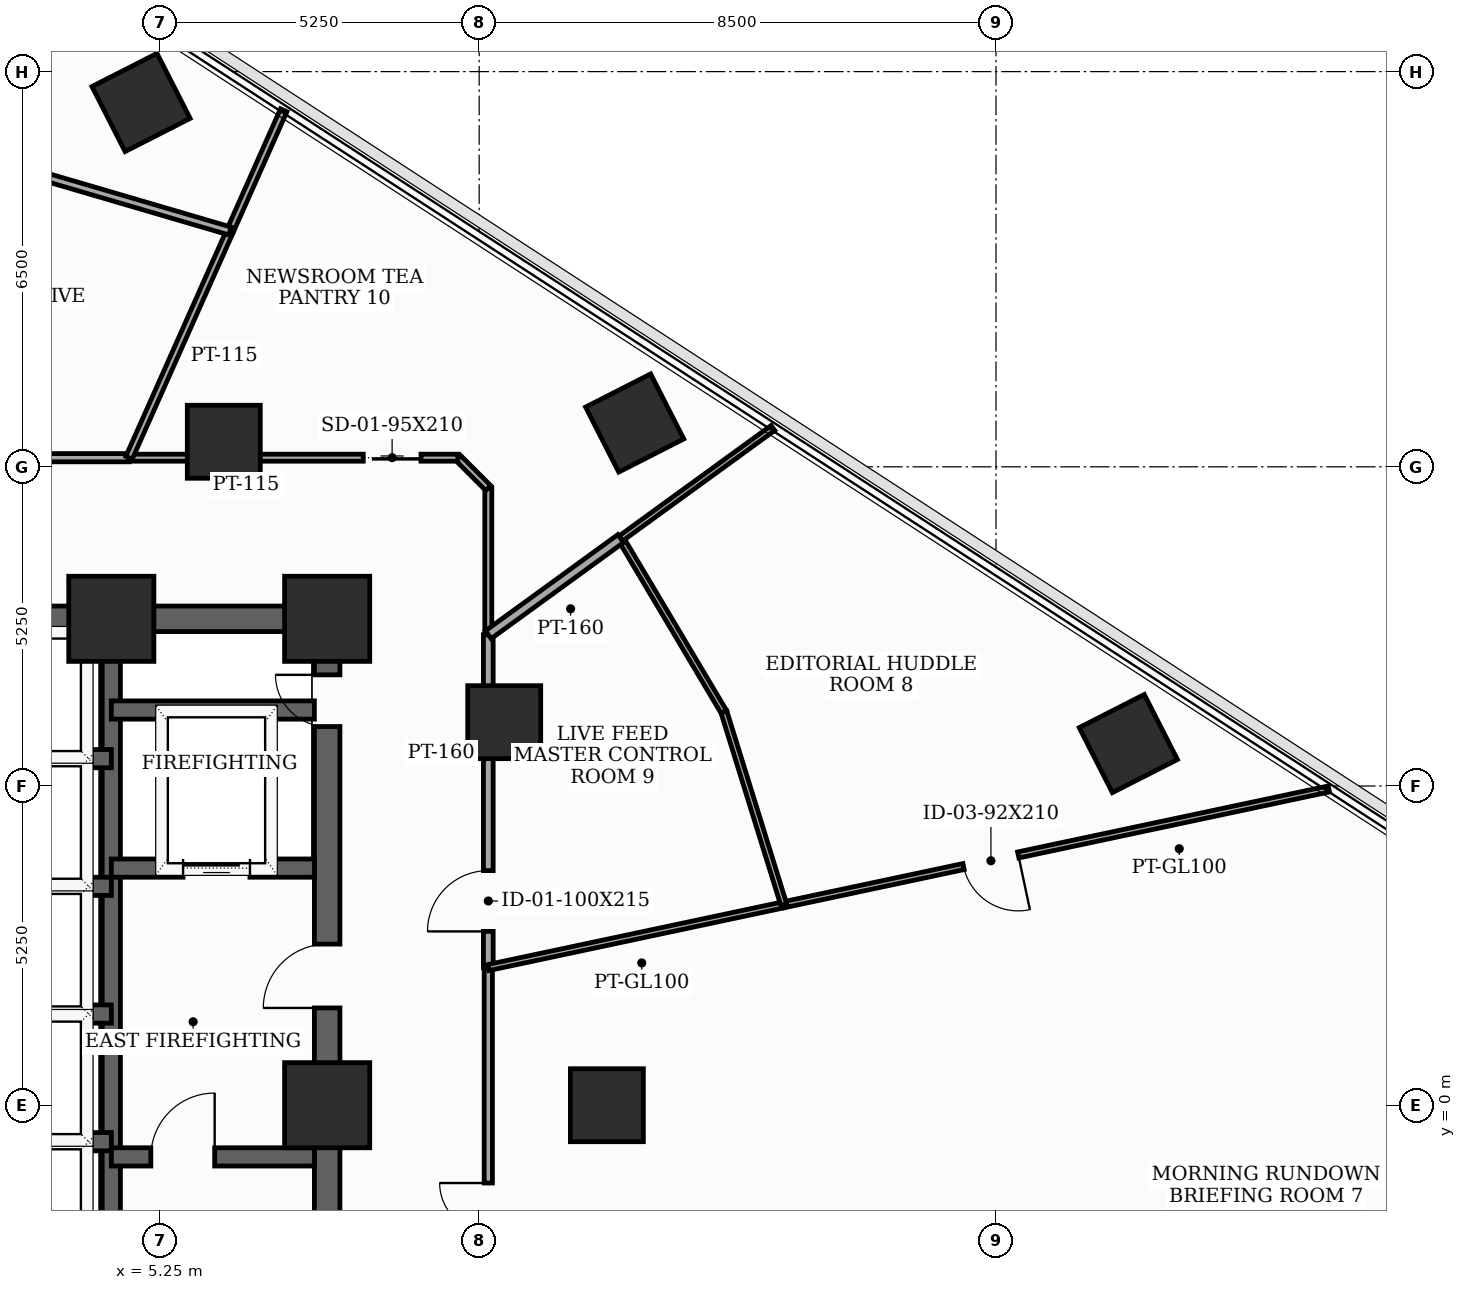
"""IFC4 building model, lengths in metres.
Left out: names, types, materials, properties, quantities, classifications, styles, units other than length and angle.
Written with IfcOpenShell. Run it as: python <this file> out.ifc"""

import sys

from ifc_helpers import new_model, si_unit, direction, frame, frame_2d, origin, origin_2d, place, context, subcontext, project, spatial, rectangle, extrude, element, fill, save


model = new_model("IFC4")
c1 = context("Model", 3, precision=1e-05, world=origin(), true_north=direction((0.0, 1.0)))
c2 = subcontext(c1, "Body", "Model", "MODEL_VIEW")
j1 = project(units=[si_unit("LENGTHUNIT", "METRE"), si_unit("PLANEANGLEUNIT", "RADIAN")], contexts=[c1])
p1 = place(None, origin())
s1 = spatial("IfcSite", under=j1, at=p1, CompositionType="ELEMENT")
p2 = place(p1, origin())
s2 = spatial("IfcBuilding", under=s1, at=p2, CompositionType="ELEMENT")
p3 = place(p2, frame((0.0, 0.0, 142.1)))
s3 = spatial("IfcBuildingStorey", under=s2, at=p3, CompositionType="ELEMENT", Elevation=142.1)
for number, where, z_axis, x_axis in (
    (1, (8.0, 0.0, 0.0), (0.0, 0.0, 1.0), (1.0, 0.0, 0.0)),
    (2, (8.0, 8.0, 0.0), (0.0, 0.0, 1.0), (1.0, 0.0, 0.0)),
    (3, (4.45, 8.0, 0.0), (0.0, 0.0, 1.0), (1.0, 0.0, 0.0)),
):
    element("IfcColumn", number, at=place(p3, frame(where, z_axis=z_axis, x_axis=x_axis)), inside=s3, PredefinedType="COLUMN", context=c2, shape_type="SweptSolid", body=[
        extrude(rectangle(XDim=1.4, YDim=1.4, at=origin_2d()), origin(), (0.0, 0.0, 1.0), 3.7),
    ])
for number, where, z_axis, x_axis in (
    (4, (12.6, 0.0, 0.0), (0.0, 0.0, 1.0), (1.0, 0.0, 0.0)),
    (5, (10.912, 6.3, 0.0), (0.0, 0.0, 1.0), (1.0, 0.0, 0.0)),
    (6, (6.3, 10.912, 0.0), (0.0, 0.0, 1.0), (1.0, 0.0, 0.0)),
    (7, (21.176, 5.948, 0.0), (0.0, 0.0, 1.0), (0.891, 0.454, 0.0)),
    (8, (13.058, 11.22, 0.0), (0.0, 0.0, 1.0), (0.891, 0.454, 0.0)),
    (9, (4.939, 16.492, 0.0), (0.0, 0.0, 1.0), (0.891, 0.454, 0.0)),
):
    element("IfcColumn", number, at=place(p3, frame(where, z_axis=z_axis, x_axis=x_axis)), inside=s3, PredefinedType="COLUMN", context=c2, shape_type="SweptSolid", body=[
        extrude(rectangle(XDim=1.2, YDim=1.2, at=origin_2d()), origin(), (0.0, 0.0, 1.0), 3.7),
    ])
p4 = place(p3, frame((8.0, -8.0, 0.0), z_axis=(0.0, 0.0, 1.0), x_axis=(0.0, 1.0, 0.0)))
e10 = element("IfcWall", 10, at=p4, inside=s3, PredefinedType="SHEAR", context=c2, shape_type="SweptSolid", body=[
    extrude(rectangle(XDim=16.0, YDim=0.42, at=frame_2d((8.0, 0.0))), origin(), (0.0, 0.0, 1.0), 3.5),
])
p5 = place(p4, frame((9.6, 0.0, 0.0)))
e11 = element("IfcOpeningElement", 11, at=p5, cuts=e10, PredefinedType="OPENING", context=c2, shape_type="SweptSolid", body=[
    extrude(rectangle(XDim=1.05, YDim=2.15, at=frame_2d((0.525, 1.075))), frame((0.0, 0.22, 0.0), z_axis=(0.0, -1.0, 0.0), x_axis=(1.0, 0.0, 0.0)), (0.0, 0.0, 1.0), 0.44),
])
p6 = place(p4, frame((14.229, 0.0, 0.0)))
e12 = element("IfcOpeningElement", 12, at=p6, cuts=e10, PredefinedType="OPENING", context=c2, shape_type="SweptSolid", body=[
    extrude(rectangle(XDim=0.85, YDim=2.02, at=frame_2d((0.425, 1.01))), frame((0.0, 0.22, 0.0), z_axis=(0.0, -1.0, 0.0), x_axis=(1.0, 0.0, 0.0)), (0.0, 0.0, 1.0), 0.44),
])
p7 = place(p3, frame((-8.0, 8.0, 0.0), z_axis=(0.0, 0.0, 1.0), x_axis=(1.0, 0.0, 0.0)))
e13 = element("IfcWall", 13, at=p7, inside=s3, PredefinedType="SHEAR", context=c2, shape_type="SweptSolid", body=[
    extrude(rectangle(XDim=16.0, YDim=0.42, at=frame_2d((8.0, 0.0))), origin(), (0.0, 0.0, 1.0), 3.5),
])
p8 = place(p7, frame((7.1, 0.0, 0.0)))
e14 = element("IfcOpeningElement", 14, at=p8, cuts=e13, PredefinedType="OPENING", context=c2, shape_type="SweptSolid", body=[
    extrude(rectangle(XDim=1.8, YDim=2.15, at=frame_2d((0.9, 1.075))), frame((0.0, 0.22, 0.0), z_axis=(0.0, -1.0, 0.0), x_axis=(1.0, 0.0, 0.0)), (0.0, 0.0, 1.0), 0.44),
])
p9 = place(p3, frame((4.45, -7.79, 0.0), z_axis=(0.0, 0.0, 1.0), x_axis=(0.0, 1.0, 0.0)))
e15 = element("IfcWall", 15, at=p9, inside=s3, PredefinedType="SHEAR", context=c2, shape_type="SweptSolid", body=[
    extrude(rectangle(XDim=15.58, YDim=0.3, at=frame_2d((7.79, 0.0))), origin(), (0.0, 0.0, 1.0), 3.5),
])
p10 = place(p3, frame((4.45, -0.85, 0.0), z_axis=(0.0, 0.0, 1.0), x_axis=(1.0, 0.0, 0.0)))
e16 = element("IfcWall", 16, at=p10, inside=s3, PredefinedType="SHEAR", context=c2, shape_type="SweptSolid", body=[
    extrude(rectangle(XDim=3.34, YDim=0.3, at=frame_2d((1.67, 0.0))), origin(), (0.0, 0.0, 1.0), 3.5),
])
p11 = place(p10, frame((0.65, 0.0, 0.0)))
e17 = element("IfcOpeningElement", 17, at=p11, cuts=e16, PredefinedType="OPENING", context=c2, shape_type="SweptSolid", body=[
    extrude(rectangle(XDim=1.05, YDim=2.15, at=frame_2d((0.525, 1.075))), frame((0.0, 0.16, 0.0), z_axis=(0.0, -1.0, 0.0), x_axis=(1.0, 0.0, 0.0)), (0.0, 0.0, 1.0), 0.32),
])
p12 = place(p3, frame((4.45, 3.9, 0.0), z_axis=(0.0, 0.0, 1.0), x_axis=(1.0, 0.0, 0.0)))
e18 = element("IfcWall", 18, at=p12, inside=s3, PredefinedType="SHEAR", context=c2, shape_type="SweptSolid", body=[
    extrude(rectangle(XDim=3.34, YDim=0.3, at=frame_2d((1.67, 0.0))), origin(), (0.0, 0.0, 1.0), 3.5),
])
p13 = place(p12, frame((1.18, 0.0, 0.0)))
e19 = element("IfcOpeningElement", 19, at=p13, cuts=e18, PredefinedType="OPENING", context=c2, shape_type="SweptSolid", body=[
    extrude(rectangle(XDim=1.1, YDim=2.1, at=frame_2d((0.55, 1.05))), frame((0.0, 0.16, 0.0), z_axis=(0.0, -1.0, 0.0), x_axis=(1.0, 0.0, 0.0)), (0.0, 0.0, 1.0), 0.32),
])
p14 = place(p3, frame((4.45, 6.5, 0.0), z_axis=(0.0, 0.0, 1.0), x_axis=(1.0, 0.0, 0.0)))
e20 = element("IfcWall", 20, at=p14, inside=s3, PredefinedType="SHEAR", context=c2, shape_type="SweptSolid", body=[
    extrude(rectangle(XDim=3.34, YDim=0.3, at=frame_2d((1.67, 0.0))), origin(), (0.0, 0.0, 1.0), 3.5),
])
for number, where, z_axis, x_axis in (
    (21, (1.68, 1.5, 0.0), (0.0, 0.0, 1.0), (1.0, 0.0, 0.0)),
    (22, (1.68, 3.6, 0.0), (0.0, 0.0, 1.0), (1.0, 0.0, 0.0)),
    (23, (1.68, 5.7, 0.0), (0.0, 0.0, 1.0), (1.0, 0.0, 0.0)),
    (24, (1.68, -0.6, 0.0), (0.0, 0.0, 1.0), (1.0, 0.0, 0.0)),
):
    element("IfcWall", number, at=place(p3, frame(where, z_axis=z_axis, x_axis=x_axis)), inside=s3, PredefinedType="SHEAR", context=c2, shape_type="SweptSolid", body=[
        extrude(rectangle(XDim=2.77, YDim=0.3, at=frame_2d((1.385, 0.0))), origin(), (0.0, 0.0, 1.0), 3.5),
    ])
p15 = place(p3, frame((10.65, -4.742, 0.0), z_axis=(0.0, 0.0, 1.0), x_axis=(0.0, 1.0, 0.0)))
e25 = element("IfcWall", 25, at=p15, inside=s3, PredefinedType="PARTITIONING", context=c2, shape_type="SweptSolid", body=[
    extrude(rectangle(XDim=7.006, YDim=0.135, at=frame_2d((3.503, 0.0))), origin(), (0.0, 0.0, 1.0), 2.785),
])
p16 = place(p15, frame((1.862, 0.0, 0.0)))
e26 = element("IfcOpeningElement", 26, at=p16, cuts=e25, PredefinedType="OPENING", context=c2, shape_type="SweptSolid", body=[
    extrude(rectangle(XDim=1.6, YDim=2.15, at=frame_2d((0.8, 1.075))), frame((0.0, 0.077, 0.0), z_axis=(0.0, -1.0, 0.0), x_axis=(1.0, 0.0, 0.0)), (0.0, 0.0, 1.0), 0.155),
])
p17 = place(p3, frame((10.65, 2.264, 0.0), z_axis=(0.0, 0.0, 1.0), x_axis=(0.0, 1.0, 0.0)))
e27 = element("IfcWall", 27, at=p17, inside=s3, PredefinedType="PARTITIONING", context=c2, shape_type="SweptSolid", body=[
    extrude(rectangle(XDim=5.474, YDim=0.16, at=frame_2d((2.737, 0.0))), origin(), (0.0, 0.0, 1.0), 2.785),
])
p18 = place(p17, frame((0.595, 0.0, 0.0)))
e28 = element("IfcOpeningElement", 28, at=p18, cuts=e27, PredefinedType="OPENING", context=c2, shape_type="SweptSolid", body=[
    extrude(rectangle(XDim=1.0, YDim=2.15, at=frame_2d((0.5, 1.075))), frame((0.0, 0.09, 0.0), z_axis=(0.0, -1.0, 0.0), x_axis=(1.0, 0.0, 0.0)), (0.0, 0.0, 1.0), 0.18),
])
p19 = place(p3, frame((10.65, 7.738, 0.0), z_axis=(0.0, 0.0, 1.0), x_axis=(0.0, 1.0, 0.0)))
e29 = element("IfcWall", 29, at=p19, inside=s3, PredefinedType="PARTITIONING", context=c2, shape_type="SweptSolid", body=[
    extrude(rectangle(XDim=2.412, YDim=0.115, at=frame_2d((1.206, 0.0))), origin(), (0.0, 0.0, 1.0), 3.125),
])
p20 = place(p3, frame((10.65, 10.15, 0.0), z_axis=(0.0, 0.0, 1.0), x_axis=(-0.707106781187, 0.707106781187, 0.0)))
e30 = element("IfcWall", 30, at=p20, inside=s3, PredefinedType="PARTITIONING", context=c2, shape_type="SweptSolid", body=[
    extrude(rectangle(XDim=0.707, YDim=0.115, at=frame_2d((0.354, 0.0))), origin(), (0.0, 0.0, 1.0), 3.125),
])
p21 = place(p3, frame((10.15, 10.65, 0.0), z_axis=(0.0, 0.0, 1.0), x_axis=(-1.0, 0.0, 0.0)))
e31 = element("IfcWall", 31, at=p21, inside=s3, PredefinedType="PARTITIONING", context=c2, shape_type="SweptSolid", body=[
    extrude(rectangle(XDim=5.408, YDim=0.115, at=frame_2d((2.704, 0.0))), origin(), (0.0, 0.0, 1.0), 2.785),
])
p22 = place(p21, frame((0.607, 0.0, 0.0)))
e32 = element("IfcOpeningElement", 32, at=p22, cuts=e31, PredefinedType="OPENING", context=c2, shape_type="SweptSolid", body=[
    extrude(rectangle(XDim=0.95, YDim=2.1, at=frame_2d((0.475, 1.05))), frame((0.0, 0.067, 0.0), z_axis=(0.0, -1.0, 0.0), x_axis=(1.0, 0.0, 0.0)), (0.0, 0.0, 1.0), 0.135),
])
p23 = place(p3, frame((4.742, 10.65, 0.0), z_axis=(0.0, 0.0, 1.0), x_axis=(-1.0, 0.0, 0.0)))
e33 = element("IfcWall", 33, at=p23, inside=s3, PredefinedType="PARTITIONING", context=c2, shape_type="SweptSolid", body=[
    extrude(rectangle(XDim=10.405, YDim=0.135, at=frame_2d((5.203, 0.0))), origin(), (0.0, 0.0, 1.0), 2.785),
])
p24 = place(p23, frame((5.976, 0.0, 0.0)))
e34 = element("IfcOpeningElement", 34, at=p24, cuts=e33, PredefinedType="OPENING", context=c2, shape_type="SweptSolid", body=[
    extrude(rectangle(XDim=0.95, YDim=2.1, at=frame_2d((0.475, 1.05))), frame((0.0, 0.077, 0.0), z_axis=(0.0, -1.0, 0.0), x_axis=(1.0, 0.0, 0.0)), (0.0, 0.0, 1.0), 0.155),
])
p25 = place(p3, frame((24.474, 5.202, 0.0), z_axis=(0.0, 0.0, 1.0), x_axis=(-0.978158512366, -0.207860348999, 0.0)))
e35 = element("IfcWall", 35, at=p25, inside=s3, PredefinedType="MOVABLE", context=c2, shape_type="SweptSolid", body=[
    extrude(rectangle(XDim=9.164, YDim=0.1, at=frame_2d((4.582, 0.0))), origin(), (0.0, 0.0, 1.0), 2.985),
])
p26 = place(p25, frame((5.221, 0.0, 0.0)))
e36 = element("IfcOpeningElement", 36, at=p26, cuts=e35, PredefinedType="OPENING", context=c2, shape_type="SweptSolid", body=[
    extrude(rectangle(XDim=0.92, YDim=2.1, at=frame_2d((0.46, 1.05))), frame((0.0, 0.06, 0.0), z_axis=(0.0, -1.0, 0.0), x_axis=(1.0, 0.0, 0.0)), (0.0, 0.0, 1.0), 0.12),
])
p27 = place(p3, frame((15.51, 3.297, 0.0), z_axis=(0.0, 0.0, 1.0), x_axis=(-0.97814123971, -0.207941614832, 0.0)))
e37 = element("IfcWall", 37, at=p27, inside=s3, PredefinedType="MOVABLE", context=c2, shape_type="SweptSolid", body=[
    extrude(rectangle(XDim=4.969, YDim=0.1, at=frame_2d((2.484, 0.0))), origin(), (0.0, 0.0, 1.0), 2.785),
])
p28 = place(p3, frame((12.828, 9.32, 0.0), z_axis=(0.0, 0.0, 1.0), x_axis=(0.511214896397, -0.859452924657, 0.0)))
e38 = element("IfcWall", 38, at=p28, inside=s3, PredefinedType="MOVABLE", context=c2, shape_type="SweptSolid", body=[
    extrude(rectangle(XDim=3.32, YDim=0.1, at=frame_2d((1.66, 0.0))), origin(), (0.0, 0.0, 1.0), 3.125),
])
p29 = place(p3, frame((14.525, 6.467, 0.0), z_axis=(0.0, 0.0, 1.0), x_axis=(0.296767013694, -0.954949914699, 0.0)))
e39 = element("IfcWall", 39, at=p29, inside=s3, PredefinedType="MOVABLE", context=c2, shape_type="SweptSolid", body=[
    extrude(rectangle(XDim=3.32, YDim=0.1, at=frame_2d((1.66, 0.0))), origin(), (0.0, 0.0, 1.0), 2.885),
])
p30 = place(p3, frame((15.331, 11.139, 0.0), z_axis=(0.0, 0.0, 1.0), x_axis=(-0.809015759361, -0.58778695214, 0.0)))
e40 = element("IfcWall", 40, at=p30, inside=s3, PredefinedType="MOVABLE", context=c2, shape_type="SweptSolid", body=[
    extrude(rectangle(XDim=3.094, YDim=0.1, at=frame_2d((1.547, 0.0))), origin(), (0.0, 0.0, 1.0), 2.985),
])
p31 = place(p3, frame((12.828, 9.32, 0.0), z_axis=(0.0, 0.0, 1.0), x_axis=(-0.809081072469, -0.587697046251, 0.0)))
e41 = element("IfcWall", 41, at=p31, inside=s3, PredefinedType="PARTITIONING", context=c2, shape_type="SweptSolid", body=[
    extrude(rectangle(XDim=2.692, YDim=0.16, at=frame_2d((1.346, 0.0))), origin(), (0.0, 0.0, 1.0), 2.885),
])
p32 = place(p3, frame((6.402, 14.378, 0.0), z_axis=(0.0, 0.0, 1.0), x_axis=(-0.406804441844, -0.913515268671, 0.0)))
e42 = element("IfcWall", 42, at=p32, inside=s3, PredefinedType="PARTITIONING", context=c2, shape_type="SweptSolid", body=[
    extrude(rectangle(XDim=4.081, YDim=0.115, at=frame_2d((2.041, 0.0))), origin(), (0.0, 0.0, 1.0), 2.785),
])
p33 = place(p3, frame((7.285, 16.364, 0.0), z_axis=(0.0, 0.0, 1.0), x_axis=(-0.406367721617, -0.913709622817, 0.0)))
e43 = element("IfcWall", 43, at=p33, inside=s3, PredefinedType="PARTITIONING", context=c2, shape_type="SweptSolid", body=[
    extrude(rectangle(XDim=2.174, YDim=0.115, at=frame_2d((1.087, 0.0))), origin(), (0.0, 0.0, 1.0), 2.985),
])
p34 = place(p3, frame((6.402, 14.378, 0.0), z_axis=(0.0, 0.0, 1.0), x_axis=(-0.959611810986, 0.2813275177, 0.0)))
e44 = element("IfcWall", 44, at=p34, inside=s3, PredefinedType="PARTITIONING", context=c2, shape_type="SweptSolid", body=[
    extrude(rectangle(XDim=4.618, YDim=0.135, at=frame_2d((2.309, 0.0))), origin(), (0.0, 0.0, 1.0), 2.885),
])
p35 = place(p5, origin())
e45 = element("IfcDoor", 45, at=p35, inside=s3, OperationType="SINGLE_SWING_LEFT", PredefinedType="DOOR", context=c2, shape_type="SweptSolid", body=[
    extrude(rectangle(XDim=1.05, YDim=2.15, at=frame_2d((0.525, 1.075))), frame((0.0, 0.025, 0.0), z_axis=(0.0, -1.0, 0.0), x_axis=(1.0, 0.0, 0.0)), (0.0, 0.0, 1.0), 0.05),
])
fill(e11, e45)
p36 = place(p6, origin())
e46 = element("IfcDoor", 46, at=p36, inside=s3, OperationType="SINGLE_SWING_RIGHT", PredefinedType="TRAPDOOR", context=c2, shape_type="SweptSolid", body=[
    extrude(rectangle(XDim=0.85, YDim=2.02, at=frame_2d((0.425, 1.01))), frame((0.0, 0.025, 0.0), z_axis=(0.0, -1.0, 0.0), x_axis=(1.0, 0.0, 0.0)), (0.0, 0.0, 1.0), 0.05),
])
fill(e12, e46)
p37 = place(p11, origin())
e47 = element("IfcDoor", 47, at=p37, inside=s3, OperationType="SINGLE_SWING_RIGHT", PredefinedType="DOOR", context=c2, shape_type="SweptSolid", body=[
    extrude(rectangle(XDim=1.05, YDim=2.15, at=frame_2d((0.525, 1.075))), frame((0.0, 0.025, 0.0), z_axis=(0.0, -1.0, 0.0), x_axis=(1.0, 0.0, 0.0)), (0.0, 0.0, 1.0), 0.05),
])
fill(e17, e47)
p38 = place(p13, origin())
e48 = element("IfcDoor", 48, at=p38, inside=s3, OperationType="SLIDING_TO_LEFT", PredefinedType="DOOR", context=c2, shape_type="SweptSolid", body=[
    extrude(rectangle(XDim=1.1, YDim=2.1, at=frame_2d((0.55, 1.05))), frame((0.0, 0.025, 0.0), z_axis=(0.0, -1.0, 0.0), x_axis=(1.0, 0.0, 0.0)), (0.0, 0.0, 1.0), 0.05),
])
fill(e19, e48)
p39 = place(p16, origin())
e49 = element("IfcDoor", 49, at=p39, inside=s3, OperationType="DOUBLE_DOOR_SINGLE_SWING", PredefinedType="DOOR", context=c2, shape_type="SweptSolid", body=[
    extrude(rectangle(XDim=1.6, YDim=2.15, at=frame_2d((0.8, 1.075))), frame((0.0, 0.025, 0.0), z_axis=(0.0, -1.0, 0.0), x_axis=(1.0, 0.0, 0.0)), (0.0, 0.0, 1.0), 0.05),
])
fill(e26, e49)
p40 = place(p18, origin())
e50 = element("IfcDoor", 50, at=p40, inside=s3, OperationType="SINGLE_SWING_LEFT", PredefinedType="DOOR", context=c2, shape_type="SweptSolid", body=[
    extrude(rectangle(XDim=1.0, YDim=2.15, at=frame_2d((0.5, 1.075))), frame((0.0, 0.025, 0.0), z_axis=(0.0, -1.0, 0.0), x_axis=(1.0, 0.0, 0.0)), (0.0, 0.0, 1.0), 0.05),
])
fill(e28, e50)
p41 = place(p22, origin())
e51 = element("IfcDoor", 51, at=p41, inside=s3, OperationType="SLIDING_TO_LEFT", PredefinedType="DOOR", context=c2, shape_type="SweptSolid", body=[
    extrude(rectangle(XDim=0.95, YDim=2.1, at=frame_2d((0.475, 1.05))), frame((0.0, 0.025, 0.0), z_axis=(0.0, -1.0, 0.0), x_axis=(1.0, 0.0, 0.0)), (0.0, 0.0, 1.0), 0.05),
])
fill(e32, e51)
p42 = place(p26, origin())
e52 = element("IfcDoor", 52, at=p42, inside=s3, OperationType="SINGLE_SWING_LEFT", PredefinedType="DOOR", context=c2, shape_type="SweptSolid", body=[
    extrude(rectangle(XDim=0.92, YDim=2.1, at=frame_2d((0.46, 1.05))), frame((0.0, 0.025, 0.0), z_axis=(0.0, -1.0, 0.0), x_axis=(1.0, 0.0, 0.0)), (0.0, 0.0, 1.0), 0.05),
])
fill(e36, e52)
save(model, sys.argv[1])
